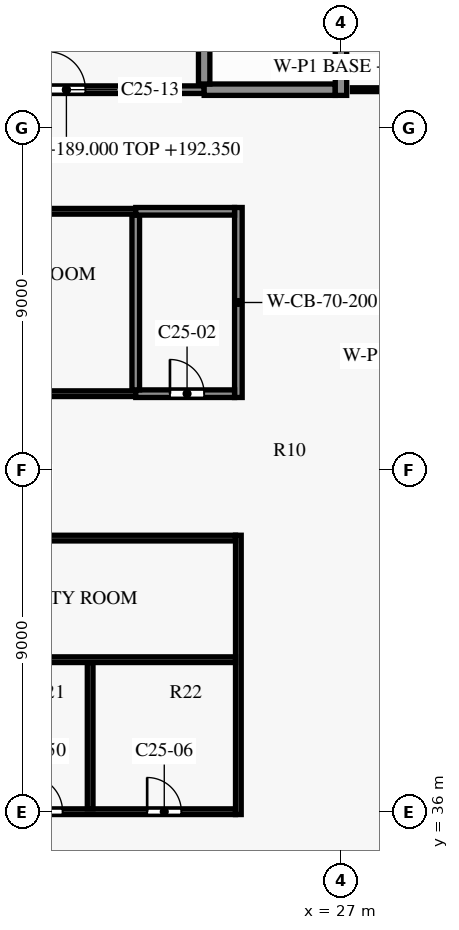
"""IFC4 building model, lengths in metres.
Left out: names, types, materials, properties, quantities, classifications, styles, units other than length and angle.
Written with IfcOpenShell. Run it as: python <this file> out.ifc"""

import sys

from ifc_helpers import new_model, si_unit, direction, frame, frame_2d, origin, place, context, subcontext, project, spatial, rectangle, extrude, element, fill, save


model = new_model("IFC4")
c1 = context("Model", 3, precision=1e-05, world=origin(), true_north=direction((0.0, 1.0)))
c2 = subcontext(c1, "Body", "Model", "MODEL_VIEW")
j1 = project(units=[si_unit("LENGTHUNIT", "METRE"), si_unit("PLANEANGLEUNIT", "RADIAN")], contexts=[c1])
p1 = place(None, origin())
s1 = spatial("IfcSite", under=j1, at=p1, CompositionType="ELEMENT")
p2 = place(p1, origin())
s2 = spatial("IfcBuilding", under=s1, at=p2, CompositionType="ELEMENT")
p3 = place(p2, frame((0.0, 0.0, 189.0)))
s3 = spatial("IfcBuildingStorey", under=s2, at=p3, CompositionType="ELEMENT", Elevation=189.0)
p4 = place(p3, frame((12.4, 36.0, 0.0), z_axis=(0.0, 0.0, 1.0), x_axis=(1.0, 0.0, 0.0)))
e1 = element("IfcWall", 1, at=p4, inside=s3, PredefinedType="SHEAR", context=c2, shape_type="SweptSolid", body=[
    extrude(rectangle(XDim=11.825, YDim=0.15, at=frame_2d((5.913, 0.0))), origin(), (0.0, 0.0, 1.0), 3.5),
])
p5 = place(p4, frame((0.95, 0.0, 0.0)))
e2 = element("IfcOpeningElement", 2, at=p5, cuts=e1, PredefinedType="OPENING", context=c2, shape_type="SweptSolid", body=[
    extrude(rectangle(XDim=0.9, YDim=2.1, at=frame_2d((0.45, 1.05))), frame((0.0, 0.085, 0.0), z_axis=(0.0, -1.0, 0.0), x_axis=(1.0, 0.0, 0.0)), (0.0, 0.0, 1.0), 0.17),
])
p6 = place(p4, frame((3.75, 0.0, 0.0)))
e3 = element("IfcOpeningElement", 3, at=p6, cuts=e1, PredefinedType="OPENING", context=c2, shape_type="SweptSolid", body=[
    extrude(rectangle(XDim=0.9, YDim=2.1, at=frame_2d((0.45, 1.05))), frame((0.0, 0.085, 0.0), z_axis=(0.0, -1.0, 0.0), x_axis=(1.0, 0.0, 0.0)), (0.0, 0.0, 1.0), 0.17),
])
p7 = place(p4, frame((6.325, 0.0, 0.0)))
e4 = element("IfcOpeningElement", 4, at=p7, cuts=e1, PredefinedType="OPENING", context=c2, shape_type="SweptSolid", body=[
    extrude(rectangle(XDim=0.95, YDim=2.1, at=frame_2d((0.475, 1.05))), frame((0.0, 0.085, 0.0), z_axis=(0.0, -1.0, 0.0), x_axis=(1.0, 0.0, 0.0)), (0.0, 0.0, 1.0), 0.17),
])
p8 = place(p4, frame((9.5, 0.0, 0.0)))
e5 = element("IfcOpeningElement", 5, at=p8, cuts=e1, PredefinedType="OPENING", context=c2, shape_type="SweptSolid", body=[
    extrude(rectangle(XDim=0.9, YDim=2.1, at=frame_2d((0.45, 1.05))), frame((0.0, 0.085, 0.0), z_axis=(0.0, -1.0, 0.0), x_axis=(1.0, 0.0, 0.0)), (0.0, 0.0, 1.0), 0.17),
])
p9 = place(p3, frame((8.1, 40.0, 0.0), z_axis=(0.0, 0.0, 1.0), x_axis=(1.0, 0.0, 0.0)))
e6 = element("IfcWall", 6, at=p9, inside=s3, PredefinedType="PARTITIONING", context=c2, shape_type="SweptSolid", body=[
    extrude(rectangle(XDim=16.125, YDim=0.15, at=frame_2d((8.062, 0.0))), origin(), (0.0, 0.0, 1.0), 3.35),
])
p10 = place(p3, frame((8.1, 43.2, 0.0), z_axis=(0.0, 0.0, 1.0), x_axis=(1.0, 0.0, 0.0)))
e7 = element("IfcWall", 7, at=p10, inside=s3, PredefinedType="PARTITIONING", context=c2, shape_type="SweptSolid", body=[
    extrude(rectangle(XDim=16.125, YDim=0.15, at=frame_2d((8.062, 0.0))), origin(), (0.0, 0.0, 1.0), 3.35),
])
p11 = place(p10, frame((1.925, 0.0, 0.0)))
e8 = element("IfcOpeningElement", 8, at=p11, cuts=e7, PredefinedType="OPENING", context=c2, shape_type="SweptSolid", body=[
    extrude(rectangle(XDim=0.9, YDim=2.1, at=frame_2d((0.45, 1.05))), frame((0.0, 0.085, 0.0), z_axis=(0.0, -1.0, 0.0), x_axis=(1.0, 0.0, 0.0)), (0.0, 0.0, 1.0), 0.17),
])
p12 = place(p10, frame((10.025, 0.0, 0.0)))
e9 = element("IfcOpeningElement", 9, at=p12, cuts=e7, PredefinedType="OPENING", context=c2, shape_type="SweptSolid", body=[
    extrude(rectangle(XDim=0.9, YDim=2.1, at=frame_2d((0.45, 1.05))), frame((0.0, 0.085, 0.0), z_axis=(0.0, -1.0, 0.0), x_axis=(1.0, 0.0, 0.0)), (0.0, 0.0, 1.0), 0.17),
])
p13 = place(p3, frame((8.1, 47.0, 0.0), z_axis=(0.0, 0.0, 1.0), x_axis=(1.0, 0.0, 0.0)))
e10 = element("IfcWall", 10, at=p13, inside=s3, PredefinedType="PARTITIONING", context=c2, shape_type="SweptSolid", body=[
    extrude(rectangle(XDim=13.5, YDim=0.15, at=frame_2d((6.75, 0.0))), origin(), (0.0, 0.0, 1.0), 3.35),
])
p14 = place(p13, frame((1.525, 0.0, 0.0)))
e11 = element("IfcOpeningElement", 11, at=p14, cuts=e10, PredefinedType="OPENING", context=c2, shape_type="SweptSolid", body=[
    extrude(rectangle(XDim=0.9, YDim=2.1, at=frame_2d((0.45, 1.05))), frame((0.0, 0.085, 0.0), z_axis=(0.0, -1.0, 0.0), x_axis=(1.0, 0.0, 0.0)), (0.0, 0.0, 1.0), 0.17),
])
p15 = place(p13, frame((8.275, 0.0, 0.0)))
e12 = element("IfcOpeningElement", 12, at=p15, cuts=e10, PredefinedType="OPENING", context=c2, shape_type="SweptSolid", body=[
    extrude(rectangle(XDim=0.9, YDim=2.1, at=frame_2d((0.45, 1.05))), frame((0.0, 0.085, 0.0), z_axis=(0.0, -1.0, 0.0), x_axis=(1.0, 0.0, 0.0)), (0.0, 0.0, 1.0), 0.17),
])
p16 = place(p3, frame((21.6, 47.0, 0.0), z_axis=(0.0, 0.0, 1.0), x_axis=(1.0, 0.0, 0.0)))
e13 = element("IfcWall", 13, at=p16, inside=s3, PredefinedType="PARTITIONING", context=c2, shape_type="SweptSolid", body=[
    extrude(rectangle(XDim=2.6, YDim=0.2, at=frame_2d((1.3, 0.0))), origin(), (0.0, 0.0, 1.0), 3.35),
])
p17 = place(p16, frame((0.9, 0.0, 0.0)))
e14 = element("IfcOpeningElement", 14, at=p17, cuts=e13, PredefinedType="OPENING", context=c2, shape_type="SweptSolid", body=[
    extrude(rectangle(XDim=0.9, YDim=2.1, at=frame_2d((0.45, 1.05))), frame((0.0, 0.11, 0.0), z_axis=(0.0, -1.0, 0.0), x_axis=(1.0, 0.0, 0.0)), (0.0, 0.0, 1.0), 0.22),
])
p18 = place(p3, frame((8.225, 51.8, 0.0), z_axis=(0.0, 0.0, 1.0), x_axis=(1.0, 0.0, 0.0)))
e15 = element("IfcWall", 15, at=p18, inside=s3, PredefinedType="PARTITIONING", context=c2, shape_type="SweptSolid", body=[
    extrude(rectangle(XDim=13.375, YDim=0.15, at=frame_2d((6.688, 0.0))), origin(), (0.0, 0.0, 1.0), 3.35),
])
p19 = place(p3, frame((21.6, 51.8, 0.0), z_axis=(0.0, 0.0, 1.0), x_axis=(1.0, 0.0, 0.0)))
e16 = element("IfcWall", 16, at=p19, inside=s3, PredefinedType="PARTITIONING", context=c2, shape_type="SweptSolid", body=[
    extrude(rectangle(XDim=2.6, YDim=0.2, at=frame_2d((1.3, 0.0))), origin(), (0.0, 0.0, 1.0), 3.35),
])
p20 = place(p3, frame((16.15, 55.0, 0.0), z_axis=(0.0, 0.0, 1.0), x_axis=(1.0, 0.0, 0.0)))
e17 = element("IfcWall", 17, at=p20, inside=s3, PredefinedType="PARTITIONING", context=c2, shape_type="SweptSolid", body=[
    extrude(rectangle(XDim=7.25, YDim=0.2, at=frame_2d((3.625, 0.0))), origin(), (0.0, 0.0, 1.0), 3.35),
])
p21 = place(p20, frame((3.125, 0.0, 0.0)))
e18 = element("IfcOpeningElement", 18, at=p21, cuts=e17, PredefinedType="OPENING", context=c2, shape_type="SweptSolid", body=[
    extrude(rectangle(XDim=1.0, YDim=2.1, at=frame_2d((0.5, 1.05))), frame((0.0, 0.11, 0.0), z_axis=(0.0, -1.0, 0.0), x_axis=(1.0, 0.0, 0.0)), (0.0, 0.0, 1.0), 0.22),
])
p22 = place(p3, frame((23.4, 55.0, 0.0), z_axis=(0.0, 0.0, 1.0), x_axis=(1.0, 0.0, 0.0)))
e19 = element("IfcWall", 19, at=p22, inside=s3, PredefinedType="SHEAR", context=c2, shape_type="SweptSolid", body=[
    extrude(rectangle(XDim=3.45, YDim=0.3, at=frame_2d((1.725, 0.0))), origin(), (0.0, 0.0, 1.0), 3.5),
])
p23 = place(p3, frame((20.4, 36.075, 0.0), z_axis=(0.0, 0.0, 1.0), x_axis=(0.0, 1.0, 0.0)))
e20 = element("IfcWall", 20, at=p23, inside=s3, PredefinedType="PARTITIONING", context=c2, shape_type="SweptSolid", body=[
    extrude(rectangle(XDim=3.85, YDim=0.15, at=frame_2d((1.925, 0.0))), origin(), (0.0, 0.0, 1.0), 3.35),
])
p24 = place(p3, frame((21.6, 47.1, 0.0), z_axis=(0.0, 0.0, 1.0), x_axis=(0.0, 1.0, 0.0)))
e21 = element("IfcWall", 21, at=p24, inside=s3, PredefinedType="PARTITIONING", context=c2, shape_type="SweptSolid", body=[
    extrude(rectangle(XDim=4.6, YDim=0.2, at=frame_2d((2.3, 0.0))), origin(), (0.0, 0.0, 1.0), 3.35),
])
p25 = place(p3, frame((23.4, 55.15, 0.0), z_axis=(0.0, 0.0, 1.0), x_axis=(0.0, 1.0, 0.0)))
e22 = element("IfcWall", 22, at=p25, inside=s3, PredefinedType="SHEAR", context=c2, shape_type="SweptSolid", body=[
    extrude(rectangle(XDim=8.0, YDim=0.3, at=frame_2d((4.0, 0.0))), origin(), (0.0, 0.0, 1.0), 3.5),
])
p26 = place(p3, frame((24.3, 35.925, 0.0), z_axis=(0.0, 0.0, 1.0), x_axis=(0.0, 1.0, 0.0)))
e23 = element("IfcWall", 23, at=p26, inside=s3, PredefinedType="PARTITIONING", context=c2, shape_type="SweptSolid", body=[
    extrude(rectangle(XDim=7.35, YDim=0.15, at=frame_2d((3.675, 0.0))), origin(), (0.0, 0.0, 1.0), 3.35),
])
p27 = place(p3, frame((24.3, 46.9, 0.0), z_axis=(0.0, 0.0, 1.0), x_axis=(0.0, 1.0, 0.0)))
e24 = element("IfcWall", 24, at=p27, inside=s3, PredefinedType="SHEAR", context=c2, shape_type="SweptSolid", body=[
    extrude(rectangle(XDim=5.0, YDim=0.2, at=frame_2d((2.5, 0.0))), origin(), (0.0, 0.0, 1.0), 3.5),
])
p28 = place(p3, frame((27.0, 54.85, 0.0), z_axis=(0.0, 0.0, 1.0), x_axis=(0.0, 1.0, 0.0)))
e25 = element("IfcWall", 25, at=p28, inside=s3, PredefinedType="SHEAR", context=c2, shape_type="SweptSolid", body=[
    extrude(rectangle(XDim=8.5, YDim=0.3, at=frame_2d((4.25, 0.0))), origin(), (0.0, 0.0, 1.0), 3.5),
])
p29 = place(p28, frame((6.55, 0.0, 0.0)))
e26 = element("IfcOpeningElement", 26, at=p29, cuts=e25, PredefinedType="OPENING", context=c2, shape_type="SweptSolid", body=[
    extrude(rectangle(XDim=1.2, YDim=2.2, at=frame_2d((0.6, 1.1))), frame((0.0, 0.16, 0.0), z_axis=(0.0, -1.0, 0.0), x_axis=(1.0, 0.0, 0.0)), (0.0, 0.0, 1.0), 0.32),
])
p30 = place(p3, frame((27.3, 55.0, 0.0), z_axis=(0.0, 0.0, 1.0), x_axis=(1.0, 0.0, 0.0)))
e27 = element("IfcWall", 27, at=p30, inside=s3, PredefinedType="PARTITIONING", context=c2, shape_type="SweptSolid", body=[
    extrude(rectangle(XDim=3.75, YDim=0.1, at=frame_2d((1.875, 0.0))), origin(), (0.0, 0.0, 1.0), 3.33),
])
p31 = place(p17, origin())
e28 = element("IfcDoor", 28, at=p31, inside=s3, OperationType="SINGLE_SWING_LEFT", PredefinedType="DOOR", context=c2, shape_type="SweptSolid", body=[
    extrude(rectangle(XDim=0.9, YDim=2.1, at=frame_2d((0.45, 1.05))), frame((0.0, 0.025, 0.0), z_axis=(0.0, -1.0, 0.0), x_axis=(1.0, 0.0, 0.0)), (0.0, 0.0, 1.0), 0.05),
])
fill(e14, e28)
p32 = place(p7, origin())
e29 = element("IfcDoor", 29, at=p32, inside=s3, OperationType="SINGLE_SWING_RIGHT", PredefinedType="DOOR", context=c2, shape_type="SweptSolid", body=[
    extrude(rectangle(XDim=0.95, YDim=2.1, at=frame_2d((0.475, 1.05))), frame((0.0, 0.025, 0.0), z_axis=(0.0, -1.0, 0.0), x_axis=(1.0, 0.0, 0.0)), (0.0, 0.0, 1.0), 0.05),
])
fill(e4, e29)
p33 = place(p8, origin())
e30 = element("IfcDoor", 30, at=p33, inside=s3, OperationType="SINGLE_SWING_LEFT", PredefinedType="DOOR", context=c2, shape_type="SweptSolid", body=[
    extrude(rectangle(XDim=0.9, YDim=2.1, at=frame_2d((0.45, 1.05))), frame((0.0, 0.025, 0.0), z_axis=(0.0, -1.0, 0.0), x_axis=(1.0, 0.0, 0.0)), (0.0, 0.0, 1.0), 0.05),
])
fill(e5, e30)
p34 = place(p21, origin())
e31 = element("IfcDoor", 31, at=p34, inside=s3, OperationType="SINGLE_SWING_RIGHT", PredefinedType="DOOR", context=c2, shape_type="SweptSolid", body=[
    extrude(rectangle(XDim=1.0, YDim=2.1, at=frame_2d((0.5, 1.05))), frame((0.0, 0.025, 0.0), z_axis=(0.0, -1.0, 0.0), x_axis=(1.0, 0.0, 0.0)), (0.0, 0.0, 1.0), 0.05),
])
fill(e18, e31)
save(model, sys.argv[1])
